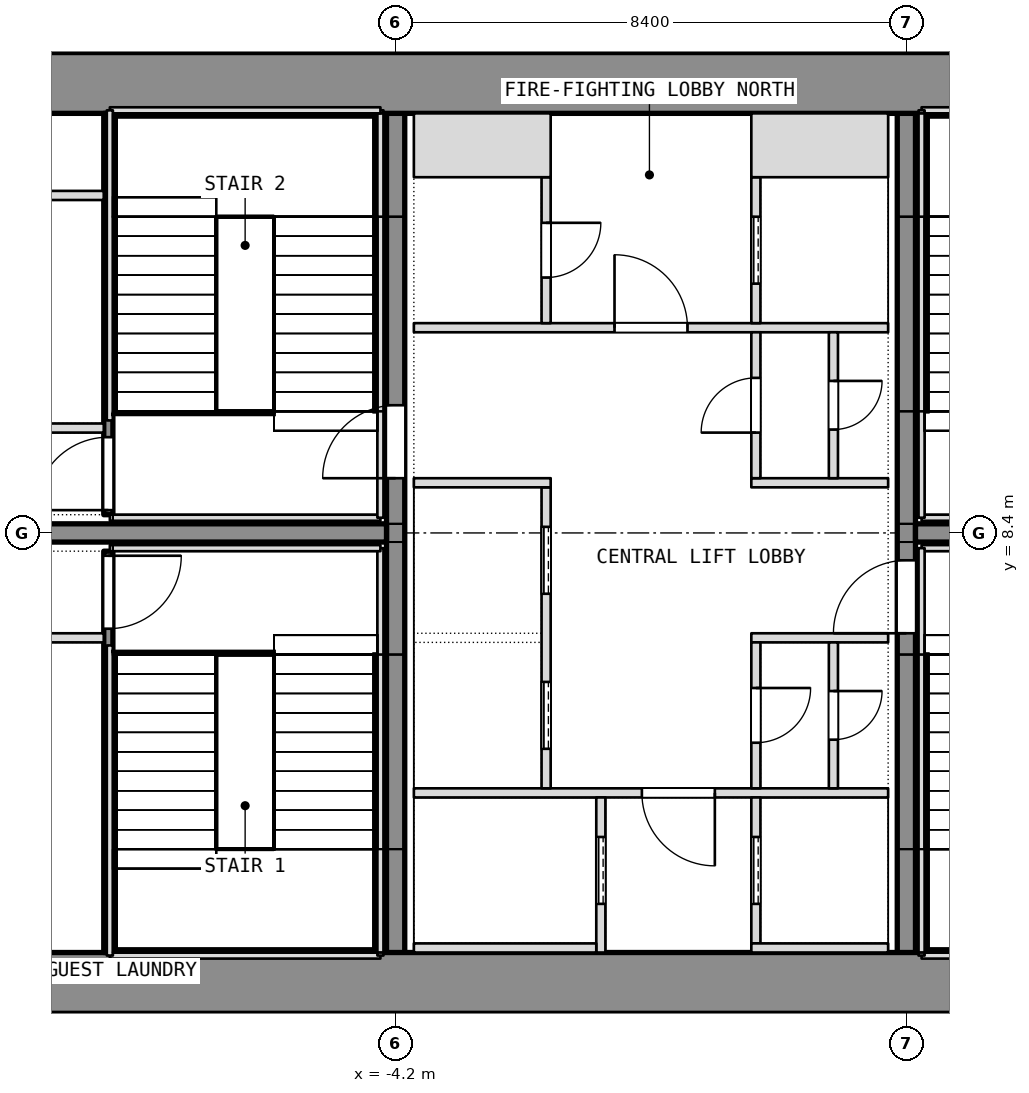
"""IFC4 building model, lengths in metres.
Left out: names, types, materials, properties, quantities, classifications, styles, units other than length and angle.
Written with IfcOpenShell. Run it as: python <this file> out.ifc"""

import sys

from ifc_helpers import new_model, si_unit, direction, frame, frame_2d, origin, place, context, subcontext, project, spatial, rectangle, extrude, element, fill, save


model = new_model("IFC4")
c1 = context("Model", 3, precision=1e-05, world=origin(), true_north=direction((0.0, 1.0)))
c2 = subcontext(c1, "Body", "Model", "MODEL_VIEW")
j1 = project(units=[si_unit("LENGTHUNIT", "METRE"), si_unit("PLANEANGLEUNIT", "RADIAN")], contexts=[c1])
p1 = place(None, origin())
s1 = spatial("IfcSite", under=j1, at=p1, CompositionType="ELEMENT")
p2 = place(p1, origin())
s2 = spatial("IfcBuilding", under=s1, at=p2, CompositionType="ELEMENT")
p3 = place(p2, frame((0.0, 0.0, 295.7)))
s3 = spatial("IfcBuildingStorey", under=s2, at=p3, CompositionType="ELEMENT", Elevation=295.7)
p4 = place(p3, frame((-4.2, 0.5, 0.0), z_axis=(0.0, 0.0, 1.0), x_axis=(0.0, 1.0, 0.0)))
e1 = element("IfcWall", 1, at=p4, inside=s3, PredefinedType="SHEAR", context=c2, shape_type="SweptSolid", body=[
    extrude(rectangle(XDim=15.8, YDim=0.3, at=frame_2d((7.9, 0.0))), origin(), (0.0, 0.0, 1.0), 14.0),
])
p5 = place(p4, frame((8.8, 0.0, 0.0)))
e2 = element("IfcOpeningElement", 2, at=p5, cuts=e1, PredefinedType="OPENING", context=c2, shape_type="SweptSolid", body=[
    extrude(rectangle(XDim=1.2, YDim=2.1, at=frame_2d((0.6, 1.05))), frame((0.0, 0.15, 0.0), z_axis=(0.0, -1.0, 0.0), x_axis=(1.0, 0.0, 0.0)), (0.0, 0.0, 1.0), 0.3),
])
p6 = place(p3, frame((4.2, 0.5, 0.0), z_axis=(0.0, 0.0, 1.0), x_axis=(0.0, 1.0, 0.0)))
e3 = element("IfcWall", 3, at=p6, inside=s3, PredefinedType="SHEAR", context=c2, shape_type="SweptSolid", body=[
    extrude(rectangle(XDim=15.8, YDim=0.3, at=frame_2d((7.9, 0.0))), origin(), (0.0, 0.0, 1.0), 14.0),
])
p7 = place(p6, frame((6.25, 0.0, 0.0)))
e4 = element("IfcOpeningElement", 4, at=p7, cuts=e3, PredefinedType="OPENING", context=c2, shape_type="SweptSolid", body=[
    extrude(rectangle(XDim=1.2, YDim=2.1, at=frame_2d((0.6, 1.05))), frame((0.0, 0.15, 0.0), z_axis=(0.0, -1.0, 0.0), x_axis=(1.0, 0.0, 0.0)), (0.0, 0.0, 1.0), 0.3),
])
for number, where, z_axis, x_axis in (
    (5, (-11.1, 8.4, 0.0), (0.0, 0.0, 1.0), (1.0, 0.0, 0.0)),
    (6, (4.35, 8.4, 0.0), (0.0, 0.0, 1.0), (1.0, 0.0, 0.0)),
):
    element("IfcWall", number, at=place(p3, frame(where, z_axis=z_axis, x_axis=x_axis)), inside=s3, PredefinedType="SHEAR", context=c2, shape_type="SweptSolid", body=[
        extrude(rectangle(XDim=6.75, YDim=0.3, at=frame_2d((3.375, 0.0))), origin(), (0.0, 0.0, 1.0), 14.0),
    ])
for number, where, z_axis, x_axis in (
    (7, (-11.1, 1.0, 0.0), (0.0, 0.0, 1.0), (1.0, 0.0, 0.0)),
    (8, (-11.1, 15.8, 0.0), (0.0, 0.0, 1.0), (1.0, 0.0, 0.0)),
):
    element("IfcWall", number, at=place(p3, frame(where, z_axis=z_axis, x_axis=x_axis)), inside=s3, PredefinedType="PARTITIONING", context=c2, shape_type="SweptSolid", body=[
        extrude(rectangle(XDim=22.2, YDim=1.0, at=frame_2d((11.1, 0.0))), origin(), (0.0, 0.0, 1.0), 13.7),
    ])
p8 = place(p3, frame((-8.925, 1.5, 0.0), z_axis=(0.0, 0.0, 1.0), x_axis=(0.0, 1.0, 0.0)))
e9 = element("IfcWall", 9, at=p8, inside=s3, PredefinedType="SHEAR", context=c2, shape_type="SweptSolid", body=[
    extrude(rectangle(XDim=6.6, YDim=0.15, at=frame_2d((3.3, 0.0))), origin(), (0.0, 0.0, 1.0), 13.7),
])
p9 = place(p8, frame((5.325, 0.0, 0.0)))
e10 = element("IfcOpeningElement", 10, at=p9, cuts=e9, PredefinedType="OPENING", context=c2, shape_type="SweptSolid", body=[
    extrude(rectangle(XDim=1.2, YDim=2.1, at=frame_2d((0.6, 1.05))), frame((0.0, 0.075, 0.0), z_axis=(0.0, -1.0, 0.0), x_axis=(1.0, 0.0, 0.0)), (0.0, 0.0, 1.0), 0.15),
])
p10 = place(p3, frame((-11.1, 6.675, 0.0), z_axis=(0.0, 0.0, 1.0), x_axis=(1.0, 0.0, 0.0)))
e11 = element("IfcWall", 11, at=p10, inside=s3, PredefinedType="PARTITIONING", context=c2, shape_type="SweptSolid", body=[
    extrude(rectangle(XDim=2.1, YDim=0.15, at=frame_2d((1.05, 0.0))), origin(), (0.0, 0.0, 1.0), 13.7),
])
p11 = place(p3, frame((-8.925, 8.7, 0.0), z_axis=(0.0, 0.0, 1.0), x_axis=(0.0, 1.0, 0.0)))
e12 = element("IfcWall", 12, at=p11, inside=s3, PredefinedType="SHEAR", context=c2, shape_type="SweptSolid", body=[
    extrude(rectangle(XDim=6.6, YDim=0.15, at=frame_2d((3.3, 0.0))), origin(), (0.0, 0.0, 1.0), 13.7),
])
p12 = place(p11, frame((0.075, 0.0, 0.0)))
e13 = element("IfcOpeningElement", 13, at=p12, cuts=e12, PredefinedType="OPENING", context=c2, shape_type="SweptSolid", body=[
    extrude(rectangle(XDim=1.2, YDim=2.1, at=frame_2d((0.6, 1.05))), frame((0.0, 0.075, 0.0), z_axis=(0.0, -1.0, 0.0), x_axis=(1.0, 0.0, 0.0)), (0.0, 0.0, 1.0), 0.15),
])
for number, where, z_axis, x_axis in (
    (14, (-11.1, 10.125, 0.0), (0.0, 0.0, 1.0), (1.0, 0.0, 0.0)),
    (15, (-11.1, 13.95, 0.0), (0.0, 0.0, 1.0), (1.0, 0.0, 0.0)),
):
    element("IfcWall", number, at=place(p3, frame(where, z_axis=z_axis, x_axis=x_axis)), inside=s3, PredefinedType="PARTITIONING", context=c2, shape_type="SweptSolid", body=[
        extrude(rectangle(XDim=2.1, YDim=0.15, at=frame_2d((1.05, 0.0))), origin(), (0.0, 0.0, 1.0), 13.7),
    ])
p13 = place(p3, frame((-3.9, 4.125, 0.0), z_axis=(0.0, 0.0, 1.0), x_axis=(1.0, 0.0, 0.0)))
e16 = element("IfcWall", 16, at=p13, inside=s3, PredefinedType="PARTITIONING", context=c2, shape_type="SweptSolid", body=[
    extrude(rectangle(XDim=7.8, YDim=0.15, at=frame_2d((3.9, 0.0))), origin(), (0.0, 0.0, 1.0), 13.7),
])
p14 = place(p13, frame((3.75, 0.0, 0.0)))
e17 = element("IfcOpeningElement", 17, at=p14, cuts=e16, PredefinedType="OPENING", context=c2, shape_type="SweptSolid", body=[
    extrude(rectangle(XDim=1.2, YDim=2.1, at=frame_2d((0.6, 1.05))), frame((0.0, 0.075, 0.0), z_axis=(0.0, -1.0, 0.0), x_axis=(1.0, 0.0, 0.0)), (0.0, 0.0, 1.0), 0.15),
])
p15 = place(p3, frame((-3.9, 11.775, 0.0), z_axis=(0.0, 0.0, 1.0), x_axis=(1.0, 0.0, 0.0)))
e18 = element("IfcWall", 18, at=p15, inside=s3, PredefinedType="PARTITIONING", context=c2, shape_type="SweptSolid", body=[
    extrude(rectangle(XDim=7.8, YDim=0.15, at=frame_2d((3.9, 0.0))), origin(), (0.0, 0.0, 1.0), 13.7),
])
p16 = place(p15, frame((3.3, 0.0, 0.0)))
e19 = element("IfcOpeningElement", 19, at=p16, cuts=e18, PredefinedType="OPENING", context=c2, shape_type="SweptSolid", body=[
    extrude(rectangle(XDim=1.2, YDim=2.1, at=frame_2d((0.6, 1.05))), frame((0.0, 0.075, 0.0), z_axis=(0.0, -1.0, 0.0), x_axis=(1.0, 0.0, 0.0)), (0.0, 0.0, 1.0), 0.15),
])
p17 = place(p3, frame((-0.825, 1.5, 0.0), z_axis=(0.0, 0.0, 1.0), x_axis=(0.0, 1.0, 0.0)))
e20 = element("IfcWall", 20, at=p17, inside=s3, PredefinedType="SHEAR", context=c2, shape_type="SweptSolid", body=[
    extrude(rectangle(XDim=2.55, YDim=0.15, at=frame_2d((1.275, 0.0))), origin(), (0.0, 0.0, 1.0), 13.7),
])
p18 = place(p17, frame((0.8, 0.0, 0.0)))
e21 = element("IfcOpeningElement", 21, at=p18, cuts=e20, PredefinedType="OPENING", context=c2, shape_type="SweptSolid", body=[
    extrude(rectangle(XDim=1.1, YDim=2.1, at=frame_2d((0.55, 1.05))), frame((0.0, 0.075, 0.0), z_axis=(0.0, -1.0, 0.0), x_axis=(1.0, 0.0, 0.0)), (0.0, 0.0, 1.0), 0.15),
])
p19 = place(p3, frame((-3.9, 1.575, 0.0), z_axis=(0.0, 0.0, 1.0), x_axis=(1.0, 0.0, 0.0)))
e22 = element("IfcWall", 22, at=p19, inside=s3, PredefinedType="SHEAR", context=c2, shape_type="SweptSolid", body=[
    extrude(rectangle(XDim=3.0, YDim=0.15, at=frame_2d((1.5, 0.0))), origin(), (0.0, 0.0, 1.0), 13.7),
])
p20 = place(p3, frame((-1.725, 4.2, 0.0), z_axis=(0.0, 0.0, 1.0), x_axis=(0.0, 1.0, 0.0)))
e23 = element("IfcWall", 23, at=p20, inside=s3, PredefinedType="SHEAR", context=c2, shape_type="SweptSolid", body=[
    extrude(rectangle(XDim=4.95, YDim=0.15, at=frame_2d((2.475, 0.0))), origin(), (0.0, 0.0, 1.0), 13.7),
])
p21 = place(p20, frame((0.65, 0.0, 0.0)))
e24 = element("IfcOpeningElement", 24, at=p21, cuts=e23, PredefinedType="OPENING", context=c2, shape_type="SweptSolid", body=[
    extrude(rectangle(XDim=1.1, YDim=2.1, at=frame_2d((0.55, 1.05))), frame((0.0, 0.075, 0.0), z_axis=(0.0, -1.0, 0.0), x_axis=(1.0, 0.0, 0.0)), (0.0, 0.0, 1.0), 0.15),
])
p22 = place(p20, frame((3.2, 0.0, 0.0)))
e25 = element("IfcOpeningElement", 25, at=p22, cuts=e23, PredefinedType="OPENING", context=c2, shape_type="SweptSolid", body=[
    extrude(rectangle(XDim=1.1, YDim=2.1, at=frame_2d((0.55, 1.05))), frame((0.0, 0.075, 0.0), z_axis=(0.0, -1.0, 0.0), x_axis=(1.0, 0.0, 0.0)), (0.0, 0.0, 1.0), 0.15),
])
p23 = place(p3, frame((-3.9, 9.225, 0.0), z_axis=(0.0, 0.0, 1.0), x_axis=(1.0, 0.0, 0.0)))
e26 = element("IfcWall", 26, at=p23, inside=s3, PredefinedType="SHEAR", context=c2, shape_type="SweptSolid", body=[
    extrude(rectangle(XDim=2.25, YDim=0.15, at=frame_2d((1.125, 0.0))), origin(), (0.0, 0.0, 1.0), 13.7),
])
p24 = place(p3, frame((-1.725, 11.85, 0.0), z_axis=(0.0, 0.0, 1.0), x_axis=(0.0, 1.0, 0.0)))
e27 = element("IfcWall", 27, at=p24, inside=s3, PredefinedType="PARTITIONING", context=c2, shape_type="SweptSolid", body=[
    extrude(rectangle(XDim=2.4, YDim=0.15, at=frame_2d((1.2, 0.0))), origin(), (0.0, 0.0, 1.0), 13.7),
])
p25 = place(p24, frame((0.75, 0.0, 0.0)))
e28 = element("IfcOpeningElement", 28, at=p25, cuts=e27, PredefinedType="OPENING", context=c2, shape_type="SweptSolid", body=[
    extrude(rectangle(XDim=0.9, YDim=2.1, at=frame_2d((0.45, 1.05))), frame((0.0, 0.075, 0.0), z_axis=(0.0, -1.0, 0.0), x_axis=(1.0, 0.0, 0.0)), (0.0, 0.0, 1.0), 0.15),
])
p26 = place(p3, frame((-3.9, 14.775, 0.0), z_axis=(0.0, 0.0, 1.0), x_axis=(1.0, 0.0, 0.0)))
e29 = element("IfcWall", 29, at=p26, inside=s3, PredefinedType="PARTITIONING", context=c2, shape_type="SweptSolid", body=[
    extrude(rectangle(XDim=2.25, YDim=1.05, at=frame_2d((1.125, 0.0))), origin(), (0.0, 0.0, 1.0), 13.7),
])
p27 = place(p3, frame((1.725, 1.65, 0.0), z_axis=(0.0, 0.0, 1.0), x_axis=(0.0, 1.0, 0.0)))
e30 = element("IfcWall", 30, at=p27, inside=s3, PredefinedType="SHEAR", context=c2, shape_type="SweptSolid", body=[
    extrude(rectangle(XDim=2.4, YDim=0.15, at=frame_2d((1.2, 0.0))), origin(), (0.0, 0.0, 1.0), 13.7),
])
p28 = place(p27, frame((0.65, 0.0, 0.0)))
e31 = element("IfcOpeningElement", 31, at=p28, cuts=e30, PredefinedType="OPENING", context=c2, shape_type="SweptSolid", body=[
    extrude(rectangle(XDim=1.1, YDim=2.1, at=frame_2d((0.55, 1.05))), frame((0.0, 0.075, 0.0), z_axis=(0.0, -1.0, 0.0), x_axis=(1.0, 0.0, 0.0)), (0.0, 0.0, 1.0), 0.15),
])
p29 = place(p3, frame((1.65, 1.575, 0.0), z_axis=(0.0, 0.0, 1.0), x_axis=(1.0, 0.0, 0.0)))
e32 = element("IfcWall", 32, at=p29, inside=s3, PredefinedType="SHEAR", context=c2, shape_type="SweptSolid", body=[
    extrude(rectangle(XDim=2.25, YDim=0.15, at=frame_2d((1.125, 0.0))), origin(), (0.0, 0.0, 1.0), 13.7),
])
p30 = place(p3, frame((1.725, 11.85, 0.0), z_axis=(0.0, 0.0, 1.0), x_axis=(0.0, 1.0, 0.0)))
e33 = element("IfcWall", 33, at=p30, inside=s3, PredefinedType="SHEAR", context=c2, shape_type="SweptSolid", body=[
    extrude(rectangle(XDim=2.4, YDim=0.15, at=frame_2d((1.2, 0.0))), origin(), (0.0, 0.0, 1.0), 13.7),
])
p31 = place(p30, frame((0.65, 0.0, 0.0)))
e34 = element("IfcOpeningElement", 34, at=p31, cuts=e33, PredefinedType="OPENING", context=c2, shape_type="SweptSolid", body=[
    extrude(rectangle(XDim=1.1, YDim=2.1, at=frame_2d((0.55, 1.05))), frame((0.0, 0.075, 0.0), z_axis=(0.0, -1.0, 0.0), x_axis=(1.0, 0.0, 0.0)), (0.0, 0.0, 1.0), 0.15),
])
p32 = place(p3, frame((1.65, 14.775, 0.0), z_axis=(0.0, 0.0, 1.0), x_axis=(1.0, 0.0, 0.0)))
e35 = element("IfcWall", 35, at=p32, inside=s3, PredefinedType="SHEAR", context=c2, shape_type="SweptSolid", body=[
    extrude(rectangle(XDim=2.25, YDim=1.05, at=frame_2d((1.125, 0.0))), origin(), (0.0, 0.0, 1.0), 13.7),
])
for number, where, z_axis, x_axis in (
    (36, (1.65, 6.675, 0.0), (0.0, 0.0, 1.0), (1.0, 0.0, 0.0)),
    (37, (1.65, 9.225, 0.0), (0.0, 0.0, 1.0), (1.0, 0.0, 0.0)),
):
    element("IfcWall", number, at=place(p3, frame(where, z_axis=z_axis, x_axis=x_axis)), inside=s3, PredefinedType="PARTITIONING", context=c2, shape_type="SweptSolid", body=[
        extrude(rectangle(XDim=2.25, YDim=0.15, at=frame_2d((1.125, 0.0))), origin(), (0.0, 0.0, 1.0), 13.7),
    ])
p33 = place(p3, frame((1.725, 4.2, 0.0), z_axis=(0.0, 0.0, 1.0), x_axis=(0.0, 1.0, 0.0)))
e38 = element("IfcWall", 38, at=p33, inside=s3, PredefinedType="PARTITIONING", context=c2, shape_type="SweptSolid", body=[
    extrude(rectangle(XDim=2.4, YDim=0.15, at=frame_2d((1.2, 0.0))), origin(), (0.0, 0.0, 1.0), 13.7),
])
p34 = place(p33, frame((0.75, 0.0, 0.0)))
e39 = element("IfcOpeningElement", 39, at=p34, cuts=e38, PredefinedType="OPENING", context=c2, shape_type="SweptSolid", body=[
    extrude(rectangle(XDim=0.9, YDim=2.1, at=frame_2d((0.45, 1.05))), frame((0.0, 0.075, 0.0), z_axis=(0.0, -1.0, 0.0), x_axis=(1.0, 0.0, 0.0)), (0.0, 0.0, 1.0), 0.15),
])
p35 = place(p3, frame((1.725, 9.3, 0.0), z_axis=(0.0, 0.0, 1.0), x_axis=(0.0, 1.0, 0.0)))
e40 = element("IfcWall", 40, at=p35, inside=s3, PredefinedType="PARTITIONING", context=c2, shape_type="SweptSolid", body=[
    extrude(rectangle(XDim=2.4, YDim=0.15, at=frame_2d((1.2, 0.0))), origin(), (0.0, 0.0, 1.0), 13.7),
])
p36 = place(p35, frame((0.75, 0.0, 0.0)))
e41 = element("IfcOpeningElement", 41, at=p36, cuts=e40, PredefinedType="OPENING", context=c2, shape_type="SweptSolid", body=[
    extrude(rectangle(XDim=0.9, YDim=2.1, at=frame_2d((0.45, 1.05))), frame((0.0, 0.075, 0.0), z_axis=(0.0, -1.0, 0.0), x_axis=(1.0, 0.0, 0.0)), (0.0, 0.0, 1.0), 0.15),
])
p37 = place(p3, frame((3.0, 4.2, 0.0), z_axis=(0.0, 0.0, 1.0), x_axis=(0.0, 1.0, 0.0)))
e42 = element("IfcWall", 42, at=p37, inside=s3, PredefinedType="PARTITIONING", context=c2, shape_type="SweptSolid", body=[
    extrude(rectangle(XDim=2.4, YDim=0.15, at=frame_2d((1.2, 0.0))), origin(), (0.0, 0.0, 1.0), 13.7),
])
p38 = place(p37, frame((0.8, 0.0, 0.0)))
e43 = element("IfcOpeningElement", 43, at=p38, cuts=e42, PredefinedType="OPENING", context=c2, shape_type="SweptSolid", body=[
    extrude(rectangle(XDim=0.8, YDim=2.1, at=frame_2d((0.4, 1.05))), frame((0.0, 0.075, 0.0), z_axis=(0.0, -1.0, 0.0), x_axis=(1.0, 0.0, 0.0)), (0.0, 0.0, 1.0), 0.15),
])
p39 = place(p3, frame((3.0, 9.3, 0.0), z_axis=(0.0, 0.0, 1.0), x_axis=(0.0, 1.0, 0.0)))
e44 = element("IfcWall", 44, at=p39, inside=s3, PredefinedType="PARTITIONING", context=c2, shape_type="SweptSolid", body=[
    extrude(rectangle(XDim=2.4, YDim=0.15, at=frame_2d((1.2, 0.0))), origin(), (0.0, 0.0, 1.0), 13.7),
])
p40 = place(p39, frame((0.8, 0.0, 0.0)))
e45 = element("IfcOpeningElement", 45, at=p40, cuts=e44, PredefinedType="OPENING", context=c2, shape_type="SweptSolid", body=[
    extrude(rectangle(XDim=0.8, YDim=2.1, at=frame_2d((0.4, 1.05))), frame((0.0, 0.075, 0.0), z_axis=(0.0, -1.0, 0.0), x_axis=(1.0, 0.0, 0.0)), (0.0, 0.0, 1.0), 0.15),
])
p41 = place(p9, origin())
e46 = element("IfcDoor", 46, at=p41, inside=s3, OperationType="SINGLE_SWING_LEFT", PredefinedType="DOOR", context=c2, shape_type="SweptSolid", body=[
    extrude(rectangle(XDim=1.2, YDim=2.1, at=frame_2d((0.6, 1.05))), frame((0.0, 0.025, 0.0), z_axis=(0.0, -1.0, 0.0), x_axis=(1.0, 0.0, 0.0)), (0.0, 0.0, 1.0), 0.05),
])
fill(e10, e46)
p42 = place(p12, origin())
e47 = element("IfcDoor", 47, at=p42, inside=s3, OperationType="SINGLE_SWING_LEFT", PredefinedType="DOOR", context=c2, shape_type="SweptSolid", body=[
    extrude(rectangle(XDim=1.2, YDim=2.1, at=frame_2d((0.6, 1.05))), frame((0.0, 0.025, 0.0), z_axis=(0.0, -1.0, 0.0), x_axis=(1.0, 0.0, 0.0)), (0.0, 0.0, 1.0), 0.05),
])
fill(e13, e47)
p43 = place(p34, origin())
e48 = element("IfcDoor", 48, at=p43, inside=s3, OperationType="SINGLE_SWING_LEFT", PredefinedType="DOOR", context=c2, shape_type="SweptSolid", body=[
    extrude(rectangle(XDim=0.9, YDim=2.1, at=frame_2d((0.45, 1.05))), frame((0.0, 0.025, 0.0), z_axis=(0.0, -1.0, 0.0), x_axis=(1.0, 0.0, 0.0)), (0.0, 0.0, 1.0), 0.05),
])
fill(e39, e48)
p44 = place(p38, origin())
e49 = element("IfcDoor", 49, at=p44, inside=s3, OperationType="SINGLE_SWING_LEFT", PredefinedType="DOOR", context=c2, shape_type="SweptSolid", body=[
    extrude(rectangle(XDim=0.8, YDim=2.1, at=frame_2d((0.4, 1.05))), frame((0.0, 0.025, 0.0), z_axis=(0.0, -1.0, 0.0), x_axis=(1.0, 0.0, 0.0)), (0.0, 0.0, 1.0), 0.05),
])
fill(e43, e49)
p45 = place(p36, origin())
e50 = element("IfcDoor", 50, at=p45, inside=s3, OperationType="SINGLE_SWING_LEFT", PredefinedType="DOOR", context=c2, shape_type="SweptSolid", body=[
    extrude(rectangle(XDim=0.9, YDim=2.1, at=frame_2d((0.45, 1.05))), frame((0.0, 0.025, 0.0), z_axis=(0.0, -1.0, 0.0), x_axis=(1.0, 0.0, 0.0)), (0.0, 0.0, 1.0), 0.05),
])
fill(e41, e50)
p46 = place(p40, origin())
e51 = element("IfcDoor", 51, at=p46, inside=s3, OperationType="SINGLE_SWING_LEFT", PredefinedType="DOOR", context=c2, shape_type="SweptSolid", body=[
    extrude(rectangle(XDim=0.8, YDim=2.1, at=frame_2d((0.4, 1.05))), frame((0.0, 0.025, 0.0), z_axis=(0.0, -1.0, 0.0), x_axis=(1.0, 0.0, 0.0)), (0.0, 0.0, 1.0), 0.05),
])
fill(e45, e51)
p47 = place(p18, origin())
e52 = element("IfcDoor", 52, at=p47, inside=s3, OperationType="SLIDING_TO_LEFT", PredefinedType="DOOR", context=c2, shape_type="SweptSolid", body=[
    extrude(rectangle(XDim=1.1, YDim=2.1, at=frame_2d((0.55, 1.05))), frame((0.0, 0.025, 0.0), z_axis=(0.0, -1.0, 0.0), x_axis=(1.0, 0.0, 0.0)), (0.0, 0.0, 1.0), 0.05),
])
fill(e21, e52)
p48 = place(p21, origin())
e53 = element("IfcDoor", 53, at=p48, inside=s3, OperationType="SLIDING_TO_LEFT", PredefinedType="DOOR", context=c2, shape_type="SweptSolid", body=[
    extrude(rectangle(XDim=1.1, YDim=2.1, at=frame_2d((0.55, 1.05))), frame((0.0, 0.025, 0.0), z_axis=(0.0, -1.0, 0.0), x_axis=(1.0, 0.0, 0.0)), (0.0, 0.0, 1.0), 0.05),
])
fill(e24, e53)
p49 = place(p22, origin())
e54 = element("IfcDoor", 54, at=p49, inside=s3, OperationType="SLIDING_TO_LEFT", PredefinedType="DOOR", context=c2, shape_type="SweptSolid", body=[
    extrude(rectangle(XDim=1.1, YDim=2.1, at=frame_2d((0.55, 1.05))), frame((0.0, 0.025, 0.0), z_axis=(0.0, -1.0, 0.0), x_axis=(1.0, 0.0, 0.0)), (0.0, 0.0, 1.0), 0.05),
])
fill(e25, e54)
p50 = place(p28, origin())
e55 = element("IfcDoor", 55, at=p50, inside=s3, OperationType="SLIDING_TO_LEFT", PredefinedType="DOOR", context=c2, shape_type="SweptSolid", body=[
    extrude(rectangle(XDim=1.1, YDim=2.1, at=frame_2d((0.55, 1.05))), frame((0.0, 0.025, 0.0), z_axis=(0.0, -1.0, 0.0), x_axis=(1.0, 0.0, 0.0)), (0.0, 0.0, 1.0), 0.05),
])
fill(e31, e55)
p51 = place(p31, origin())
e56 = element("IfcDoor", 56, at=p51, inside=s3, OperationType="SLIDING_TO_LEFT", PredefinedType="DOOR", context=c2, shape_type="SweptSolid", body=[
    extrude(rectangle(XDim=1.1, YDim=2.1, at=frame_2d((0.55, 1.05))), frame((0.0, 0.025, 0.0), z_axis=(0.0, -1.0, 0.0), x_axis=(1.0, 0.0, 0.0)), (0.0, 0.0, 1.0), 0.05),
])
fill(e34, e56)
p52 = place(p14, origin())
e57 = element("IfcDoor", 57, at=p52, inside=s3, OperationType="SINGLE_SWING_LEFT", PredefinedType="DOOR", context=c2, shape_type="SweptSolid", body=[
    extrude(rectangle(XDim=1.2, YDim=2.1, at=frame_2d((0.6, 1.05))), frame((0.0, 0.025, 0.0), z_axis=(0.0, -1.0, 0.0), x_axis=(1.0, 0.0, 0.0)), (0.0, 0.0, 1.0), 0.05),
])
fill(e17, e57)
p53 = place(p16, origin())
e58 = element("IfcDoor", 58, at=p53, inside=s3, OperationType="SINGLE_SWING_LEFT", PredefinedType="DOOR", context=c2, shape_type="SweptSolid", body=[
    extrude(rectangle(XDim=1.2, YDim=2.1, at=frame_2d((0.6, 1.05))), frame((0.0, 0.025, 0.0), z_axis=(0.0, -1.0, 0.0), x_axis=(1.0, 0.0, 0.0)), (0.0, 0.0, 1.0), 0.05),
])
fill(e19, e58)
p54 = place(p25, origin())
e59 = element("IfcDoor", 59, at=p54, inside=s3, OperationType="SINGLE_SWING_LEFT", PredefinedType="DOOR", context=c2, shape_type="SweptSolid", body=[
    extrude(rectangle(XDim=0.9, YDim=2.1, at=frame_2d((0.45, 1.05))), frame((0.0, 0.025, 0.0), z_axis=(0.0, -1.0, 0.0), x_axis=(1.0, 0.0, 0.0)), (0.0, 0.0, 1.0), 0.05),
])
fill(e28, e59)
p55 = place(p5, origin())
e60 = element("IfcDoor", 60, at=p55, inside=s3, OperationType="SINGLE_SWING_LEFT", PredefinedType="DOOR", context=c2, shape_type="SweptSolid", body=[
    extrude(rectangle(XDim=1.2, YDim=2.1, at=frame_2d((0.6, 1.05))), frame((0.0, 0.025, 0.0), z_axis=(0.0, -1.0, 0.0), x_axis=(1.0, 0.0, 0.0)), (0.0, 0.0, 1.0), 0.05),
])
fill(e2, e60)
p56 = place(p7, origin())
e61 = element("IfcDoor", 61, at=p56, inside=s3, OperationType="SINGLE_SWING_LEFT", PredefinedType="DOOR", context=c2, shape_type="SweptSolid", body=[
    extrude(rectangle(XDim=1.2, YDim=2.1, at=frame_2d((0.6, 1.05))), frame((0.0, 0.025, 0.0), z_axis=(0.0, -1.0, 0.0), x_axis=(1.0, 0.0, 0.0)), (0.0, 0.0, 1.0), 0.05),
])
fill(e4, e61)
save(model, sys.argv[1])
